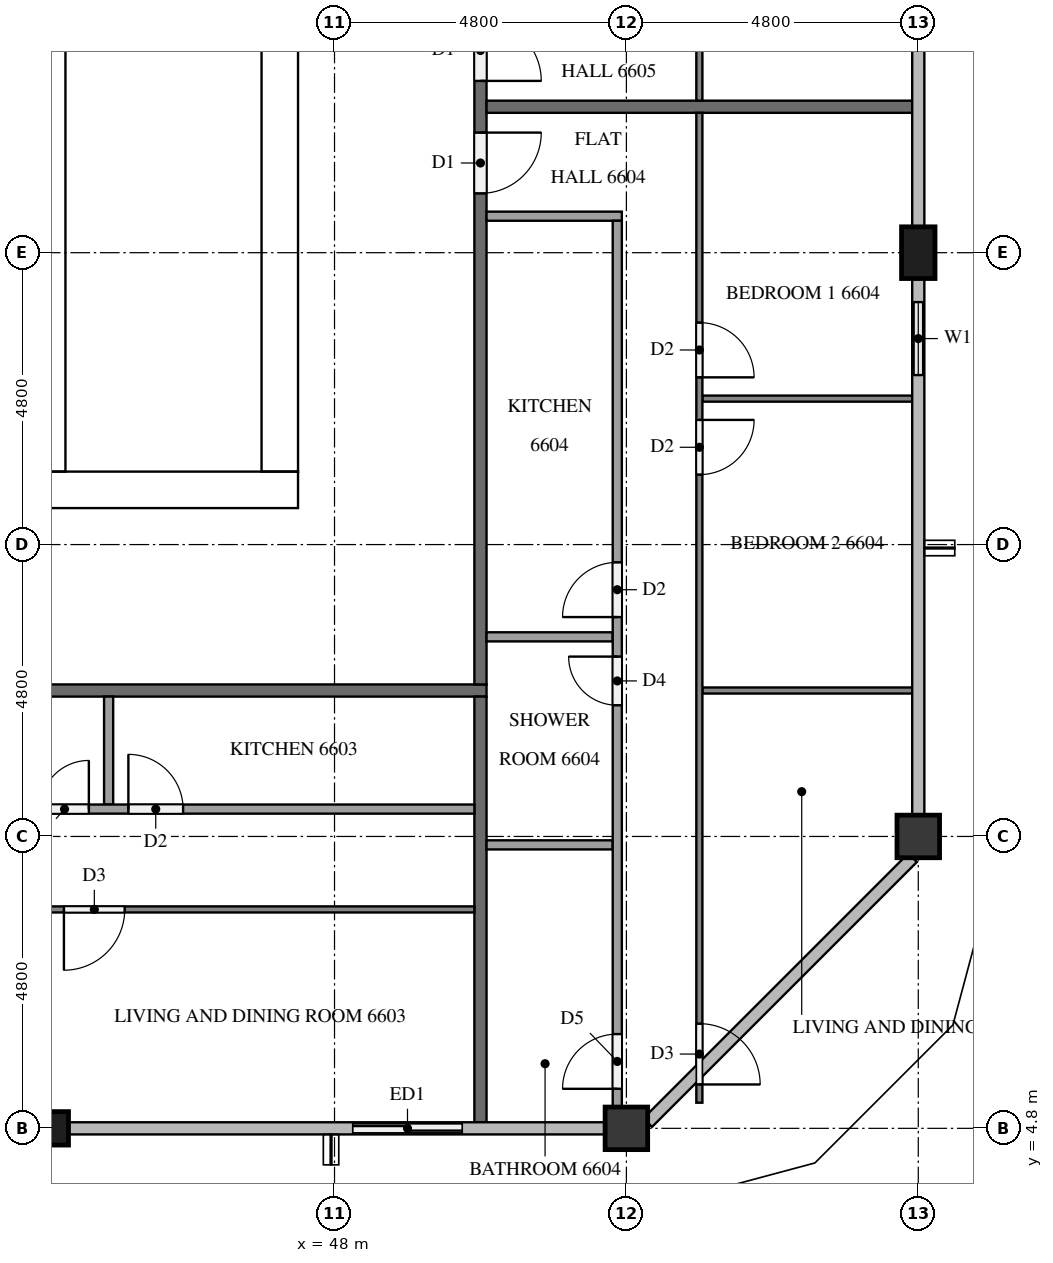
"""IFC4 building model, lengths in metres.
Left out: names, types, materials, properties, quantities, classifications, styles, units other than length and angle.
Written with IfcOpenShell. Run it as: python <this file> out.ifc"""

import sys

from ifc_helpers import new_model, si_unit, direction, frame, frame_2d, origin, origin_2d, place, context, subcontext, project, spatial, rectangle, extrude, element, fill, save


model = new_model("IFC4")
c1 = context("Model", 3, precision=1e-05, world=origin(), true_north=direction((0.0, 1.0)))
c2 = subcontext(c1, "Body", "Model", "MODEL_VIEW")
j1 = project(units=[si_unit("LENGTHUNIT", "METRE"), si_unit("PLANEANGLEUNIT", "RADIAN")], contexts=[c1])
p1 = place(None, origin())
s1 = spatial("IfcSite", under=j1, at=p1, CompositionType="ELEMENT")
p2 = place(p1, origin())
s2 = spatial("IfcBuilding", under=s1, at=p2, CompositionType="ELEMENT")
p3 = place(p2, frame((0.0, 0.0, 252.7)))
s3 = spatial("IfcBuildingStorey", under=s2, at=p3, CompositionType="ELEMENT", Elevation=252.7)
p4 = place(p3, frame((15.0, 15.3, 0.0), z_axis=(0.0, 0.0, 1.0), x_axis=(1.0, 0.0, 0.0)))
e1 = element("IfcWall", 1, at=p4, inside=s3, PredefinedType="SHEAR", context=c2, shape_type="SweptSolid", body=[
    extrude(rectangle(XDim=32.4, YDim=0.6, at=frame_2d((16.2, 0.0))), origin(), (0.0, 0.0, 1.0), 3.2),
])
p5 = place(p4, frame((15.3, 0.0, 0.0)))
e2 = element("IfcOpeningElement", 2, at=p5, cuts=e1, PredefinedType="OPENING", context=c2, shape_type="SweptSolid", body=[
    extrude(rectangle(XDim=1.8, YDim=2.1, at=frame_2d((0.9, 1.05))), frame((0.0, 0.31, 0.0), z_axis=(0.0, -1.0, 0.0), x_axis=(1.0, 0.0, 0.0)), (0.0, 0.0, 1.0), 0.62),
])
p6 = place(p3, frame((47.1, 15.6, 0.0), z_axis=(0.0, 0.0, 1.0), x_axis=(0.0, 1.0, 0.0)))
e3 = element("IfcWall", 3, at=p6, inside=s3, PredefinedType="SHEAR", context=c2, shape_type="SweptSolid", body=[
    extrude(rectangle(XDim=21.6, YDim=0.6, at=frame_2d((10.8, 0.0))), origin(), (0.0, 0.0, 1.0), 3.2),
])
p7 = place(p6, frame((10.5, 0.0, 0.0)))
e4 = element("IfcOpeningElement", 4, at=p7, cuts=e3, PredefinedType="OPENING", context=c2, shape_type="SweptSolid", body=[
    extrude(rectangle(XDim=1.2, YDim=2.1, at=frame_2d((0.6, 1.05))), frame((0.0, 0.31, 0.0), z_axis=(0.0, -1.0, 0.0), x_axis=(1.0, 0.0, 0.0)), (0.0, 0.0, 1.0), 0.62),
])
p8 = place(p3, frame((43.35, 15.6, 0.0), z_axis=(0.0, 0.0, 1.0), x_axis=(0.0, 1.0, 0.0)))
e5 = element("IfcWall", 5, at=p8, inside=s3, PredefinedType="SHEAR", context=c2, shape_type="SweptSolid", body=[
    extrude(rectangle(XDim=8.65, YDim=0.45, at=frame_2d((4.325, 0.0))), origin(), (0.0, 0.0, 1.0), 3.2),
])
p9 = place(p8, frame((0.6, 0.0, 0.0)))
e6 = element("IfcOpeningElement", 6, at=p9, cuts=e5, PredefinedType="OPENING", context=c2, shape_type="SweptSolid", body=[
    extrude(rectangle(XDim=1.2, YDim=2.1, at=frame_2d((0.6, 1.05))), frame((0.0, 0.235, 0.0), z_axis=(0.0, -1.0, 0.0), x_axis=(1.0, 0.0, 0.0)), (0.0, 0.0, 1.0), 0.47),
])
p10 = place(p3, frame((43.2, 4.8, 0.0), z_axis=(0.0, 0.0, 1.0), x_axis=(1.0, 0.0, 0.0)))
e7 = element("IfcColumn", 7, at=p10, inside=s3, PredefinedType="COLUMN", context=c2, shape_type="SweptSolid", body=[
    extrude(rectangle(XDim=0.85, YDim=0.55, at=origin_2d()), origin(), (0.0, 0.0, 1.0), 3.2),
])
for number, where, z_axis, x_axis in (
    (8, (52.8, 4.8, 0.0), (0.0, 0.0, 1.0), (1.0, 0.0, 0.0)),
    (9, (57.6, 9.6, 0.0), (0.0, 0.0, 1.0), (1.0, 0.0, 0.0)),
):
    element("IfcColumn", number, at=place(p3, frame(where, z_axis=z_axis, x_axis=x_axis)), inside=s3, PredefinedType="COLUMN", context=c2, shape_type="SweptSolid", body=[
        extrude(rectangle(XDim=0.7, YDim=0.7, at=origin_2d()), origin(), (0.0, 0.0, 1.0), 3.2),
    ])
p11 = place(p3, frame((57.6, 19.2, 0.0), z_axis=(0.0, 0.0, 1.0), x_axis=(0.0, 1.0, 0.0)))
e10 = element("IfcColumn", 10, at=p11, inside=s3, PredefinedType="COLUMN", context=c2, shape_type="SweptSolid", body=[
    extrude(rectangle(XDim=0.85, YDim=0.55, at=origin_2d()), origin(), (0.0, 0.0, 1.0), 3.2),
])
p12 = place(p3, frame((48.0, 4.8, 0.0), z_axis=(0.0, 0.0, 1.0), x_axis=(1.0, 0.0, 0.0)))
e11 = element("IfcWall", 11, at=p12, inside=s3, PredefinedType="SOLIDWALL", context=c2, shape_type="SweptSolid", body=[
    extrude(rectangle(XDim=2.4, YDim=0.15, at=frame_2d((1.2, 0.0))), origin(), (0.0, 0.0, 1.0), 3.2),
])
p13 = place(p12, frame((0.3, 0.0, 0.0)))
e12 = element("IfcOpeningElement", 12, at=p13, cuts=e11, PredefinedType="OPENING", context=c2, shape_type="SweptSolid", body=[
    extrude(rectangle(XDim=1.8, YDim=2.4, at=frame_2d((0.9, 1.2))), frame((0.0, 0.085, 0.0), z_axis=(0.0, -1.0, 0.0), x_axis=(1.0, 0.0, 0.0)), (0.0, 0.0, 1.0), 0.17),
])
p14 = place(p3, frame((57.6, 16.8, 0.0), z_axis=(0.0, 0.0, 1.0), x_axis=(0.0, 1.0, 0.0)))
e13 = element("IfcWall", 13, at=p14, inside=s3, PredefinedType="SOLIDWALL", context=c2, shape_type="SweptSolid", body=[
    extrude(rectangle(XDim=1.975, YDim=0.15, at=frame_2d((0.987, 0.0))), origin(), (0.0, 0.0, 1.0), 3.2),
])
p15 = place(p14, frame((0.387, 0.0, 0.9)))
e14 = element("IfcOpeningElement", 14, at=p15, cuts=e13, PredefinedType="OPENING", context=c2, shape_type="SweptSolid", body=[
    extrude(rectangle(XDim=1.2, YDim=1.4, at=frame_2d((0.6, 0.7))), frame((0.0, 0.085, 0.0), z_axis=(0.0, -1.0, 0.0), x_axis=(1.0, 0.0, 0.0)), (0.0, 0.0, 1.0), 0.17),
])
p16 = place(p3, frame((50.5, 12.0, 0.0), z_axis=(0.0, 0.0, 1.0), x_axis=(-1.0, 0.0, 0.0)))
e15 = element("IfcWall", 15, at=p16, inside=s3, PredefinedType="PARTITIONING", context=c2, shape_type="SweptSolid", body=[
    extrude(rectangle(XDim=38.6, YDim=0.2, at=frame_2d((19.3, 0.0))), origin(), (0.0, 0.0, 1.0), 3.2),
])
p17 = place(p16, frame((37.075, 0.0, 0.0)))
e16 = element("IfcOpeningElement", 16, at=p17, cuts=e15, PredefinedType="OPENING", context=c2, shape_type="SweptSolid", body=[
    extrude(rectangle(XDim=1.0, YDim=2.1, at=frame_2d((0.5, 1.05))), frame((0.0, 0.11, 0.0), z_axis=(0.0, -1.0, 0.0), x_axis=(1.0, 0.0, 0.0)), (0.0, 0.0, 1.0), 0.22),
])
p18 = place(p16, frame((12.525, 0.0, 0.0)))
e17 = element("IfcOpeningElement", 17, at=p18, cuts=e15, PredefinedType="OPENING", context=c2, shape_type="SweptSolid", body=[
    extrude(rectangle(XDim=1.0, YDim=2.1, at=frame_2d((0.5, 1.05))), frame((0.0, 0.11, 0.0), z_axis=(0.0, -1.0, 0.0), x_axis=(1.0, 0.0, 0.0)), (0.0, 0.0, 1.0), 0.22),
])
p19 = place(p16, frame((10.675, 0.0, 0.0)))
e18 = element("IfcOpeningElement", 18, at=p19, cuts=e15, PredefinedType="OPENING", context=c2, shape_type="SweptSolid", body=[
    extrude(rectangle(XDim=1.0, YDim=2.1, at=frame_2d((0.5, 1.05))), frame((0.0, 0.11, 0.0), z_axis=(0.0, -1.0, 0.0), x_axis=(1.0, 0.0, 0.0)), (0.0, 0.0, 1.0), 0.22),
])
p20 = place(p3, frame((50.4, 40.7, 0.0), z_axis=(0.0, 0.0, 1.0), x_axis=(0.0, -1.0, 0.0)))
e19 = element("IfcWall", 19, at=p20, inside=s3, PredefinedType="PARTITIONING", context=c2, shape_type="SweptSolid", body=[
    extrude(rectangle(XDim=28.6, YDim=0.2, at=frame_2d((14.3, 0.0))), origin(), (0.0, 0.0, 1.0), 3.2),
])
p21 = place(p20, frame((19.525, 0.0, 0.0)))
e20 = element("IfcOpeningElement", 20, at=p21, cuts=e19, PredefinedType="OPENING", context=c2, shape_type="SweptSolid", body=[
    extrude(rectangle(XDim=1.0, YDim=2.1, at=frame_2d((0.5, 1.05))), frame((0.0, 0.11, 0.0), z_axis=(0.0, -1.0, 0.0), x_axis=(1.0, 0.0, 0.0)), (0.0, 0.0, 1.0), 0.22),
])
p22 = place(p20, frame((17.675, 0.0, 0.0)))
e21 = element("IfcOpeningElement", 21, at=p22, cuts=e19, PredefinedType="OPENING", context=c2, shape_type="SweptSolid", body=[
    extrude(rectangle(XDim=1.0, YDim=2.1, at=frame_2d((0.5, 1.05))), frame((0.0, 0.11, 0.0), z_axis=(0.0, -1.0, 0.0), x_axis=(1.0, 0.0, 0.0)), (0.0, 0.0, 1.0), 0.22),
])
p23 = place(p20, frame((0.325, 0.0, 0.0)))
e22 = element("IfcOpeningElement", 22, at=p23, cuts=e19, PredefinedType="OPENING", context=c2, shape_type="SweptSolid", body=[
    extrude(rectangle(XDim=1.0, YDim=2.1, at=frame_2d((0.5, 1.05))), frame((0.0, 0.11, 0.0), z_axis=(0.0, -1.0, 0.0), x_axis=(1.0, 0.0, 0.0)), (0.0, 0.0, 1.0), 0.22),
])
for number, where, z_axis, x_axis in (
    (23, (50.4, 11.9, 0.0), (0.0, 0.0, 1.0), (0.0, -1.0, 0.0)),
    (24, (50.5, 21.6, 0.0), (0.0, 0.0, 1.0), (1.0, 0.0, 0.0)),
):
    element("IfcWall", number, at=place(p3, frame(where, z_axis=z_axis, x_axis=x_axis)), inside=s3, PredefinedType="PARTITIONING", context=c2, shape_type="SweptSolid", body=[
        extrude(rectangle(XDim=7.0, YDim=0.2, at=frame_2d((3.5, 0.0))), origin(), (0.0, 0.0, 1.0), 3.2),
    ])
p24 = place(p3, frame((50.3, 8.4, 0.0), z_axis=(0.0, 0.0, 1.0), x_axis=(-1.0, 0.0, 0.0)))
e25 = element("IfcWall", 25, at=p24, inside=s3, PredefinedType="PARTITIONING", context=c2, shape_type="SweptSolid", body=[
    extrude(rectangle(XDim=11.8, YDim=0.1, at=frame_2d((5.9, 0.0))), origin(), (0.0, 0.0, 1.0), 3.2),
])
p25 = place(p24, frame((7.45, 0.0, 0.0)))
e26 = element("IfcOpeningElement", 26, at=p25, cuts=e25, PredefinedType="OPENING", context=c2, shape_type="SweptSolid", body=[
    extrude(rectangle(XDim=0.9, YDim=2.1, at=frame_2d((0.45, 1.05))), frame((0.0, 0.06, 0.0), z_axis=(0.0, -1.0, 0.0), x_axis=(1.0, 0.0, 0.0)), (0.0, 0.0, 1.0), 0.12),
])
p26 = place(p24, frame((5.75, 0.0, 0.0)))
e27 = element("IfcOpeningElement", 27, at=p26, cuts=e25, PredefinedType="OPENING", context=c2, shape_type="SweptSolid", body=[
    extrude(rectangle(XDim=1.0, YDim=2.1, at=frame_2d((0.5, 1.05))), frame((0.0, 0.06, 0.0), z_axis=(0.0, -1.0, 0.0), x_axis=(1.0, 0.0, 0.0)), (0.0, 0.0, 1.0), 0.12),
])
p27 = place(p3, frame((44.285, 11.9, 0.0), z_axis=(0.0, 0.0, 1.0), x_axis=(0.0, -1.0, 0.0)))
e28 = element("IfcWall", 28, at=p27, inside=s3, PredefinedType="PARTITIONING", context=c2, shape_type="SweptSolid", body=[
    extrude(rectangle(XDim=1.775, YDim=0.15, at=frame_2d((0.887, 0.0))), origin(), (0.0, 0.0, 1.0), 3.2),
])
p28 = place(p3, frame((40.275, 10.05, 0.0), z_axis=(0.0, 0.0, 1.0), x_axis=(1.0, 0.0, 0.0)))
e29 = element("IfcWall", 29, at=p28, inside=s3, PredefinedType="PARTITIONING", context=c2, shape_type="SweptSolid", body=[
    extrude(rectangle(XDim=10.025, YDim=0.15, at=frame_2d((5.013, 0.0))), origin(), (0.0, 0.0, 1.0), 3.2),
])
p29 = place(p28, frame((2.885, 0.0, 0.0)))
e30 = element("IfcOpeningElement", 30, at=p29, cuts=e29, PredefinedType="OPENING", context=c2, shape_type="SweptSolid", body=[
    extrude(rectangle(XDim=0.8, YDim=2.1, at=frame_2d((0.4, 1.05))), frame((0.0, 0.085, 0.0), z_axis=(0.0, -1.0, 0.0), x_axis=(1.0, 0.0, 0.0)), (0.0, 0.0, 1.0), 0.17),
])
p30 = place(p28, frame((4.335, 0.0, 0.0)))
e31 = element("IfcOpeningElement", 31, at=p30, cuts=e29, PredefinedType="OPENING", context=c2, shape_type="SweptSolid", body=[
    extrude(rectangle(XDim=0.9, YDim=2.1, at=frame_2d((0.45, 1.05))), frame((0.0, 0.085, 0.0), z_axis=(0.0, -1.0, 0.0), x_axis=(1.0, 0.0, 0.0)), (0.0, 0.0, 1.0), 0.17),
])
for number, where, z_axis, x_axis in (
    (32, (54.05, 16.8, 0.0), (0.0, 0.0, 1.0), (1.0, 0.0, 0.0)),
    (33, (54.05, 12.0, 0.0), (0.0, 0.0, 1.0), (1.0, 0.0, 0.0)),
):
    element("IfcWall", number, at=place(p3, frame(where, z_axis=z_axis, x_axis=x_axis)), inside=s3, PredefinedType="PARTITIONING", context=c2, shape_type="SweptSolid", body=[
        extrude(rectangle(XDim=3.45, YDim=0.1, at=frame_2d((1.725, 0.0))), origin(), (0.0, 0.0, 1.0), 3.2),
    ])
p31 = place(p3, frame((54.0, 21.5, 0.0), z_axis=(0.0, 0.0, 1.0), x_axis=(0.0, -1.0, 0.0)))
e34 = element("IfcWall", 34, at=p31, inside=s3, PredefinedType="PARTITIONING", context=c2, shape_type="SweptSolid", body=[
    extrude(rectangle(XDim=16.279, YDim=0.1, at=frame_2d((8.139, 0.0))), origin(), (0.0, 0.0, 1.0), 3.2),
])
p32 = place(p31, frame((3.45, 0.0, 0.0)))
e35 = element("IfcOpeningElement", 35, at=p32, cuts=e34, PredefinedType="OPENING", context=c2, shape_type="SweptSolid", body=[
    extrude(rectangle(XDim=0.9, YDim=2.1, at=frame_2d((0.45, 1.05))), frame((0.0, 0.06, 0.0), z_axis=(0.0, -1.0, 0.0), x_axis=(1.0, 0.0, 0.0)), (0.0, 0.0, 1.0), 0.12),
])
p33 = place(p31, frame((5.05, 0.0, 0.0)))
e36 = element("IfcOpeningElement", 36, at=p33, cuts=e34, PredefinedType="OPENING", context=c2, shape_type="SweptSolid", body=[
    extrude(rectangle(XDim=0.9, YDim=2.1, at=frame_2d((0.45, 1.05))), frame((0.0, 0.06, 0.0), z_axis=(0.0, -1.0, 0.0), x_axis=(1.0, 0.0, 0.0)), (0.0, 0.0, 1.0), 0.12),
])
p34 = place(p31, frame((14.979, 0.0, 0.0)))
e37 = element("IfcOpeningElement", 37, at=p34, cuts=e34, PredefinedType="OPENING", context=c2, shape_type="SweptSolid", body=[
    extrude(rectangle(XDim=1.0, YDim=2.1, at=frame_2d((0.5, 1.05))), frame((0.0, 0.06, 0.0), z_axis=(0.0, -1.0, 0.0), x_axis=(1.0, 0.0, 0.0)), (0.0, 0.0, 1.0), 0.12),
])
for number, where, z_axis, x_axis in (
    (38, (50.5, 12.883, 0.0), (0.0, 0.0, 1.0), (1.0, 0.0, 0.0)),
    (39, (50.5, 9.461, 0.0), (0.0, 0.0, 1.0), (1.0, 0.0, 0.0)),
):
    element("IfcWall", number, at=place(p3, frame(where, z_axis=z_axis, x_axis=x_axis)), inside=s3, PredefinedType="PARTITIONING", context=c2, shape_type="SweptSolid", body=[
        extrude(rectangle(XDim=2.075, YDim=0.15, at=frame_2d((1.038, 0.0))), origin(), (0.0, 0.0, 1.0), 3.2),
    ])
p35 = place(p3, frame((50.5, 19.8, 0.0), z_axis=(0.0, 0.0, 1.0), x_axis=(1.0, 0.0, 0.0)))
e40 = element("IfcWall", 40, at=p35, inside=s3, PredefinedType="PARTITIONING", context=c2, shape_type="SweptSolid", body=[
    extrude(rectangle(XDim=2.225, YDim=0.15, at=frame_2d((1.113, 0.0))), origin(), (0.0, 0.0, 1.0), 3.2),
])
p36 = place(p3, frame((52.65, 5.15, 0.0), z_axis=(0.0, 0.0, 1.0), x_axis=(0.0, 1.0, 0.0)))
e41 = element("IfcWall", 41, at=p36, inside=s3, PredefinedType="PARTITIONING", context=c2, shape_type="SweptSolid", body=[
    extrude(rectangle(XDim=14.575, YDim=0.15, at=frame_2d((7.288, 0.0))), origin(), (0.0, 0.0, 1.0), 3.2),
])
p37 = place(p36, frame((8.058, 0.0, 0.0)))
e42 = element("IfcOpeningElement", 42, at=p37, cuts=e41, PredefinedType="OPENING", context=c2, shape_type="SweptSolid", body=[
    extrude(rectangle(XDim=0.9, YDim=2.1, at=frame_2d((0.45, 1.05))), frame((0.0, 0.085, 0.0), z_axis=(0.0, -1.0, 0.0), x_axis=(1.0, 0.0, 0.0)), (0.0, 0.0, 1.0), 0.17),
])
p38 = place(p36, frame((6.608, 0.0, 0.0)))
e43 = element("IfcOpeningElement", 43, at=p38, cuts=e41, PredefinedType="OPENING", context=c2, shape_type="SweptSolid", body=[
    extrude(rectangle(XDim=0.8, YDim=2.1, at=frame_2d((0.4, 1.05))), frame((0.0, 0.085, 0.0), z_axis=(0.0, -1.0, 0.0), x_axis=(1.0, 0.0, 0.0)), (0.0, 0.0, 1.0), 0.17),
])
p39 = place(p36, frame((0.3, 0.0, 0.0)))
e44 = element("IfcOpeningElement", 44, at=p39, cuts=e41, PredefinedType="OPENING", context=c2, shape_type="SweptSolid", body=[
    extrude(rectangle(XDim=0.9, YDim=2.1, at=frame_2d((0.45, 1.05))), frame((0.0, 0.085, 0.0), z_axis=(0.0, -1.0, 0.0), x_axis=(1.0, 0.0, 0.0)), (0.0, 0.0, 1.0), 0.17),
])
p40 = place(p3, frame((54.0, 31.1, 0.0), z_axis=(0.0, 0.0, 1.0), x_axis=(0.0, -1.0, 0.0)))
e45 = element("IfcWall", 45, at=p40, inside=s3, PredefinedType="PARTITIONING", context=c2, shape_type="SweptSolid", body=[
    extrude(rectangle(XDim=9.4, YDim=0.1, at=frame_2d((4.7, 0.0))), origin(), (0.0, 0.0, 1.0), 3.2),
])
p41 = place(p40, frame((5.05, 0.0, 0.0)))
e46 = element("IfcOpeningElement", 46, at=p41, cuts=e45, PredefinedType="OPENING", context=c2, shape_type="SweptSolid", body=[
    extrude(rectangle(XDim=1.0, YDim=2.1, at=frame_2d((0.5, 1.05))), frame((0.0, 0.06, 0.0), z_axis=(0.0, -1.0, 0.0), x_axis=(1.0, 0.0, 0.0)), (0.0, 0.0, 1.0), 0.12),
])
p42 = place(p40, frame((3.45, 0.0, 0.0)))
e47 = element("IfcOpeningElement", 47, at=p42, cuts=e45, PredefinedType="OPENING", context=c2, shape_type="SweptSolid", body=[
    extrude(rectangle(XDim=0.9, YDim=2.1, at=frame_2d((0.45, 1.05))), frame((0.0, 0.06, 0.0), z_axis=(0.0, -1.0, 0.0), x_axis=(1.0, 0.0, 0.0)), (0.0, 0.0, 1.0), 0.12),
])
p43 = place(p13, origin())
e48 = element("IfcDoor", 48, at=p43, inside=s3, OperationType="SLIDING_TO_RIGHT", PredefinedType="DOOR", context=c2, shape_type="SweptSolid", body=[
    extrude(rectangle(XDim=1.8, YDim=2.4, at=frame_2d((0.9, 1.2))), frame((0.0, 0.025, 0.0), z_axis=(0.0, -1.0, 0.0), x_axis=(1.0, 0.0, 0.0)), (0.0, 0.0, 1.0), 0.05),
])
fill(e12, e48)
p44 = place(p15, origin())
e49 = element("IfcWindow", 49, at=p44, inside=s3, PartitioningType="SINGLE_PANEL", PredefinedType="WINDOW", context=c2, shape_type="SweptSolid", body=[
    extrude(rectangle(XDim=1.2, YDim=1.4, at=frame_2d((0.6, 0.7))), frame((0.0, 0.03, 0.0), z_axis=(0.0, -1.0, 0.0), x_axis=(1.0, 0.0, 0.0)), (0.0, 0.0, 1.0), 0.06),
])
fill(e14, e49)
p45 = place(p9, origin())
e50 = element("IfcDoor", 50, at=p45, inside=s3, OperationType="SINGLE_SWING_LEFT", PredefinedType="DOOR", context=c2, shape_type="SweptSolid", body=[
    extrude(rectangle(XDim=1.2, YDim=2.1, at=frame_2d((0.6, 1.05))), frame((0.0, 0.025, 0.0), z_axis=(0.0, -1.0, 0.0), x_axis=(1.0, 0.0, 0.0)), (0.0, 0.0, 1.0), 0.05),
])
fill(e6, e50)
p46 = place(p21, origin())
e51 = element("IfcDoor", 51, at=p46, inside=s3, OperationType="SINGLE_SWING_LEFT", PredefinedType="DOOR", context=c2, shape_type="SweptSolid", body=[
    extrude(rectangle(XDim=1.0, YDim=2.1, at=frame_2d((0.5, 1.05))), frame((0.0, 0.025, 0.0), z_axis=(0.0, -1.0, 0.0), x_axis=(1.0, 0.0, 0.0)), (0.0, 0.0, 1.0), 0.05),
])
fill(e20, e51)
p47 = place(p22, origin())
e52 = element("IfcDoor", 52, at=p47, inside=s3, OperationType="SINGLE_SWING_RIGHT", PredefinedType="DOOR", context=c2, shape_type="SweptSolid", body=[
    extrude(rectangle(XDim=1.0, YDim=2.1, at=frame_2d((0.5, 1.05))), frame((0.0, 0.025, 0.0), z_axis=(0.0, -1.0, 0.0), x_axis=(1.0, 0.0, 0.0)), (0.0, 0.0, 1.0), 0.05),
])
fill(e21, e52)
p48 = place(p26, origin())
e53 = element("IfcDoor", 53, at=p48, inside=s3, OperationType="SINGLE_SWING_RIGHT", PredefinedType="DOOR", context=c2, shape_type="SweptSolid", body=[
    extrude(rectangle(XDim=1.0, YDim=2.1, at=frame_2d((0.5, 1.05))), frame((0.0, 0.025, 0.0), z_axis=(0.0, -1.0, 0.0), x_axis=(1.0, 0.0, 0.0)), (0.0, 0.0, 1.0), 0.05),
])
fill(e27, e53)
p49 = place(p29, origin())
e54 = element("IfcDoor", 54, at=p49, inside=s3, OperationType="SINGLE_SWING_RIGHT", PredefinedType="DOOR", context=c2, shape_type="SweptSolid", body=[
    extrude(rectangle(XDim=0.8, YDim=2.1, at=frame_2d((0.4, 1.05))), frame((0.0, 0.025, 0.0), z_axis=(0.0, -1.0, 0.0), x_axis=(1.0, 0.0, 0.0)), (0.0, 0.0, 1.0), 0.05),
])
fill(e30, e54)
p50 = place(p30, origin())
e55 = element("IfcDoor", 55, at=p50, inside=s3, OperationType="SINGLE_SWING_LEFT", PredefinedType="DOOR", context=c2, shape_type="SweptSolid", body=[
    extrude(rectangle(XDim=0.9, YDim=2.1, at=frame_2d((0.45, 1.05))), frame((0.0, 0.025, 0.0), z_axis=(0.0, -1.0, 0.0), x_axis=(1.0, 0.0, 0.0)), (0.0, 0.0, 1.0), 0.05),
])
fill(e31, e55)
p51 = place(p32, origin())
e56 = element("IfcDoor", 56, at=p51, inside=s3, OperationType="SINGLE_SWING_RIGHT", PredefinedType="DOOR", context=c2, shape_type="SweptSolid", body=[
    extrude(rectangle(XDim=0.9, YDim=2.1, at=frame_2d((0.45, 1.05))), frame((0.0, 0.025, 0.0), z_axis=(0.0, -1.0, 0.0), x_axis=(1.0, 0.0, 0.0)), (0.0, 0.0, 1.0), 0.05),
])
fill(e35, e56)
p52 = place(p33, origin())
e57 = element("IfcDoor", 57, at=p52, inside=s3, OperationType="SINGLE_SWING_LEFT", PredefinedType="DOOR", context=c2, shape_type="SweptSolid", body=[
    extrude(rectangle(XDim=0.9, YDim=2.1, at=frame_2d((0.45, 1.05))), frame((0.0, 0.025, 0.0), z_axis=(0.0, -1.0, 0.0), x_axis=(1.0, 0.0, 0.0)), (0.0, 0.0, 1.0), 0.05),
])
fill(e36, e57)
p53 = place(p34, origin())
e58 = element("IfcDoor", 58, at=p53, inside=s3, OperationType="SINGLE_SWING_RIGHT", PredefinedType="DOOR", context=c2, shape_type="SweptSolid", body=[
    extrude(rectangle(XDim=1.0, YDim=2.1, at=frame_2d((0.5, 1.05))), frame((0.0, 0.025, 0.0), z_axis=(0.0, -1.0, 0.0), x_axis=(1.0, 0.0, 0.0)), (0.0, 0.0, 1.0), 0.05),
])
fill(e37, e58)
p54 = place(p37, origin())
e59 = element("IfcDoor", 59, at=p54, inside=s3, OperationType="SINGLE_SWING_LEFT", PredefinedType="DOOR", context=c2, shape_type="SweptSolid", body=[
    extrude(rectangle(XDim=0.9, YDim=2.1, at=frame_2d((0.45, 1.05))), frame((0.0, 0.025, 0.0), z_axis=(0.0, -1.0, 0.0), x_axis=(1.0, 0.0, 0.0)), (0.0, 0.0, 1.0), 0.05),
])
fill(e42, e59)
p55 = place(p38, origin())
e60 = element("IfcDoor", 60, at=p55, inside=s3, OperationType="SINGLE_SWING_RIGHT", PredefinedType="DOOR", context=c2, shape_type="SweptSolid", body=[
    extrude(rectangle(XDim=0.8, YDim=2.1, at=frame_2d((0.4, 1.05))), frame((0.0, 0.025, 0.0), z_axis=(0.0, -1.0, 0.0), x_axis=(1.0, 0.0, 0.0)), (0.0, 0.0, 1.0), 0.05),
])
fill(e43, e60)
p56 = place(p39, origin())
e61 = element("IfcDoor", 61, at=p56, inside=s3, OperationType="SINGLE_SWING_LEFT", PredefinedType="DOOR", context=c2, shape_type="SweptSolid", body=[
    extrude(rectangle(XDim=0.9, YDim=2.1, at=frame_2d((0.45, 1.05))), frame((0.0, 0.025, 0.0), z_axis=(0.0, -1.0, 0.0), x_axis=(1.0, 0.0, 0.0)), (0.0, 0.0, 1.0), 0.05),
])
fill(e44, e61)
save(model, sys.argv[1])
